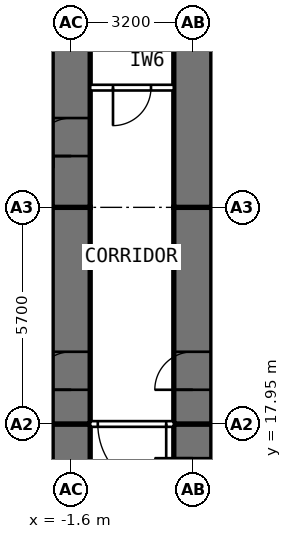
"""IFC4 building model, lengths in metres.
Left out: names, types, materials, properties, quantities, classifications, styles, units other than length and angle.
Written with IfcOpenShell. Run it as: python <this file> out.ifc"""

import sys

from ifc_helpers import new_model, si_unit, direction, frame, frame_2d, origin, place, context, subcontext, project, spatial, rectangle, extrude, element, fill, save


model = new_model("IFC4")
c1 = context("Model", 3, precision=1e-05, world=origin(), true_north=direction((0.0, 1.0)))
c2 = subcontext(c1, "Body", "Model", "MODEL_VIEW")
j1 = project(units=[si_unit("LENGTHUNIT", "METRE"), si_unit("PLANEANGLEUNIT", "RADIAN")], contexts=[c1])
p1 = place(None, origin())
s1 = spatial("IfcSite", under=j1, at=p1, CompositionType="ELEMENT")
p2 = place(p1, origin())
s2 = spatial("IfcBuilding", under=s1, at=p2, CompositionType="ELEMENT")
p3 = place(p2, frame((0.0, 0.0, 98.8)))
s3 = spatial("IfcBuildingStorey", under=s2, at=p3, CompositionType="ELEMENT", Elevation=98.8)
p4 = place(p3, frame((-1.6, 9.6, 0.0), z_axis=(0.0, 0.0, 1.0), x_axis=(0.0, 1.0, 0.0)))
e1 = element("IfcWall", 1, at=p4, inside=s3, PredefinedType="SHEAR", context=c2, shape_type="SweptSolid", body=[
    extrude(rectangle(XDim=8.35, YDim=1.0, at=frame_2d((4.175, 0.0))), origin(), (0.0, 0.0, 1.0), 3.6),
])
p5 = place(p4, frame((1.3, 0.0, 0.0)))
e2 = element("IfcOpeningElement", 2, at=p5, cuts=e1, PredefinedType="OPENING", context=c2, shape_type="SweptSolid", body=[
    extrude(rectangle(XDim=1.0, YDim=2.1, at=frame_2d((0.5, 1.05))), frame((0.0, 0.512, 0.0), z_axis=(0.0, -1.0, 0.0), x_axis=(1.0, 0.0, 0.0)), (0.0, 0.0, 1.0), 1.024),
])
p6 = place(p3, frame((-1.6, 17.95, 0.0), z_axis=(0.0, 0.0, 1.0), x_axis=(0.0, 1.0, 0.0)))
e3 = element("IfcWall", 3, at=p6, inside=s3, PredefinedType="SHEAR", context=c2, shape_type="SweptSolid", body=[
    extrude(rectangle(XDim=5.7, YDim=1.0, at=frame_2d((2.85, 0.0))), origin(), (0.0, 0.0, 1.0), 3.6),
])
p7 = place(p6, frame((0.9, 0.0, 0.0)))
e4 = element("IfcOpeningElement", 4, at=p7, cuts=e3, PredefinedType="OPENING", context=c2, shape_type="SweptSolid", body=[
    extrude(rectangle(XDim=1.0, YDim=2.1, at=frame_2d((0.5, 1.05))), frame((0.0, 0.512, 0.0), z_axis=(0.0, -1.0, 0.0), x_axis=(1.0, 0.0, 0.0)), (0.0, 0.0, 1.0), 1.024),
])
p8 = place(p3, frame((-1.6, 23.65, 0.0), z_axis=(0.0, 0.0, 1.0), x_axis=(0.0, 1.0, 0.0)))
e5 = element("IfcWall", 5, at=p8, inside=s3, PredefinedType="SHEAR", context=c2, shape_type="SweptSolid", body=[
    extrude(rectangle(XDim=10.745, YDim=1.0, at=frame_2d((5.373, 0.0))), origin(), (0.0, 0.0, 1.0), 3.6),
])
p9 = place(p8, frame((1.35, 0.0, 0.0)))
e6 = element("IfcOpeningElement", 6, at=p9, cuts=e5, PredefinedType="OPENING", context=c2, shape_type="SweptSolid", body=[
    extrude(rectangle(XDim=1.0, YDim=2.1, at=frame_2d((0.5, 1.05))), frame((0.0, 0.512, 0.0), z_axis=(0.0, -1.0, 0.0), x_axis=(1.0, 0.0, 0.0)), (0.0, 0.0, 1.0), 1.024),
])
p10 = place(p3, frame((1.6, 9.6, 0.0), z_axis=(0.0, 0.0, 1.0), x_axis=(0.0, 1.0, 0.0)))
e7 = element("IfcWall", 7, at=p10, inside=s3, PredefinedType="SHEAR", context=c2, shape_type="SweptSolid", body=[
    extrude(rectangle(XDim=8.35, YDim=1.0, at=frame_2d((4.175, 0.0))), origin(), (0.0, 0.0, 1.0), 3.6),
])
p11 = place(p10, frame((6.45, 0.0, 0.0)))
e8 = element("IfcOpeningElement", 8, at=p11, cuts=e7, PredefinedType="OPENING", context=c2, shape_type="SweptSolid", body=[
    extrude(rectangle(XDim=1.0, YDim=2.1, at=frame_2d((0.5, 1.05))), frame((0.0, 0.512, 0.0), z_axis=(0.0, -1.0, 0.0), x_axis=(1.0, 0.0, 0.0)), (0.0, 0.0, 1.0), 1.024),
])
p12 = place(p3, frame((1.6, 17.95, 0.0), z_axis=(0.0, 0.0, 1.0), x_axis=(0.0, 1.0, 0.0)))
e9 = element("IfcWall", 9, at=p12, inside=s3, PredefinedType="SHEAR", context=c2, shape_type="SweptSolid", body=[
    extrude(rectangle(XDim=5.7, YDim=1.0, at=frame_2d((2.85, 0.0))), origin(), (0.0, 0.0, 1.0), 3.6),
])
p13 = place(p12, frame((0.9, 0.0, 0.0)))
e10 = element("IfcOpeningElement", 10, at=p13, cuts=e9, PredefinedType="OPENING", context=c2, shape_type="SweptSolid", body=[
    extrude(rectangle(XDim=1.0, YDim=2.1, at=frame_2d((0.5, 1.05))), frame((0.0, 0.512, 0.0), z_axis=(0.0, -1.0, 0.0), x_axis=(1.0, 0.0, 0.0)), (0.0, 0.0, 1.0), 1.024),
])
p14 = place(p3, frame((1.6, 23.65, 0.0), z_axis=(0.0, 0.0, 1.0), x_axis=(0.0, 1.0, 0.0)))
e11 = element("IfcWall", 11, at=p14, inside=s3, PredefinedType="SHEAR", context=c2, shape_type="SweptSolid", body=[
    extrude(rectangle(XDim=10.745, YDim=1.0, at=frame_2d((5.373, 0.0))), origin(), (0.0, 0.0, 1.0), 3.6),
])
p15 = place(p3, frame((2.1, 17.95, 0.0), z_axis=(0.0, 0.0, 1.0), x_axis=(1.0, 0.0, 0.0)))
e12 = element("IfcWall", 12, at=p15, inside=s3, PredefinedType="PARTITIONING", context=c2, shape_type="SweptSolid", body=[
    extrude(rectangle(XDim=8.6, YDim=0.2, at=frame_2d((4.3, 0.0))), origin(), (0.0, 0.0, 1.0), 2.45),
])
p16 = place(p3, frame((1.1, 26.8, 0.0), z_axis=(0.0, 0.0, 1.0), x_axis=(-1.0, 0.0, 0.0)))
e13 = element("IfcWall", 13, at=p16, inside=s3, PredefinedType="PARTITIONING", context=c2, shape_type="SweptSolid", body=[
    extrude(rectangle(XDim=2.2, YDim=0.15, at=frame_2d((1.1, 0.0))), origin(), (0.0, 0.0, 1.0), 3.35),
])
p17 = place(p16, frame((0.6, 0.0, 0.0)))
e14 = element("IfcOpeningElement", 14, at=p17, cuts=e13, PredefinedType="OPENING", context=c2, shape_type="SweptSolid", body=[
    extrude(rectangle(XDim=1.0, YDim=2.1, at=frame_2d((0.5, 1.05))), frame((0.0, 0.087, 0.0), z_axis=(0.0, -1.0, 0.0), x_axis=(1.0, 0.0, 0.0)), (0.0, 0.0, 1.0), 0.174),
])
p18 = place(p3, frame((1.1, 17.95, 0.0), z_axis=(0.0, 0.0, 1.0), x_axis=(-1.0, 0.0, 0.0)))
e15 = element("IfcWall", 15, at=p18, inside=s3, PredefinedType="PARTITIONING", context=c2, shape_type="SweptSolid", body=[
    extrude(rectangle(XDim=2.2, YDim=0.15, at=frame_2d((1.1, 0.0))), origin(), (0.0, 0.0, 1.0), 3.35),
])
p19 = place(p18, frame((0.2, 0.0, 0.0)))
e16 = element("IfcOpeningElement", 16, at=p19, cuts=e15, PredefinedType="OPENING", context=c2, shape_type="SweptSolid", body=[
    extrude(rectangle(XDim=1.8, YDim=2.1, at=frame_2d((0.9, 1.05))), frame((0.0, 0.087, 0.0), z_axis=(0.0, -1.0, 0.0), x_axis=(1.0, 0.0, 0.0)), (0.0, 0.0, 1.0), 0.174),
])
p20 = place(p7, origin())
e17 = element("IfcDoor", 17, at=p20, inside=s3, OperationType="SINGLE_SWING_LEFT", PredefinedType="DOOR", context=c2, shape_type="SweptSolid", body=[
    extrude(rectangle(XDim=1.0, YDim=2.1, at=frame_2d((0.5, 1.05))), frame((0.0, 0.25, 0.0), z_axis=(0.0, -1.0, 0.0), x_axis=(1.0, 0.0, 0.0)), (0.0, 0.0, 1.0), 0.5),
])
fill(e4, e17)
p21 = place(p11, origin())
e18 = element("IfcDoor", 18, at=p21, inside=s3, OperationType="SINGLE_SWING_RIGHT", PredefinedType="DOOR", context=c2, shape_type="SweptSolid", body=[
    extrude(rectangle(XDim=1.0, YDim=2.1, at=frame_2d((0.5, 1.05))), frame((0.0, 0.25, 0.0), z_axis=(0.0, -1.0, 0.0), x_axis=(1.0, 0.0, 0.0)), (0.0, 0.0, 1.0), 0.5),
])
fill(e8, e18)
p22 = place(p13, origin())
e19 = element("IfcDoor", 19, at=p22, inside=s3, OperationType="SINGLE_SWING_LEFT", PredefinedType="DOOR", context=c2, shape_type="SweptSolid", body=[
    extrude(rectangle(XDim=1.0, YDim=2.1, at=frame_2d((0.5, 1.05))), frame((0.0, 0.25, 0.0), z_axis=(0.0, -1.0, 0.0), x_axis=(1.0, 0.0, 0.0)), (0.0, 0.0, 1.0), 0.5),
])
fill(e10, e19)
p23 = place(p17, origin())
e20 = element("IfcDoor", 20, at=p23, inside=s3, OperationType="SINGLE_SWING_RIGHT", PredefinedType="DOOR", context=c2, shape_type="SweptSolid", body=[
    extrude(rectangle(XDim=1.0, YDim=2.1, at=frame_2d((0.5, 1.05))), frame((0.0, 0.025, 0.0), z_axis=(0.0, -1.0, 0.0), x_axis=(1.0, 0.0, 0.0)), (0.0, 0.0, 1.0), 0.05),
])
fill(e14, e20)
p24 = place(p19, origin())
e21 = element("IfcDoor", 21, at=p24, inside=s3, OperationType="DOUBLE_DOOR_DOUBLE_SWING", PredefinedType="DOOR", context=c2, shape_type="SweptSolid", body=[
    extrude(rectangle(XDim=1.8, YDim=2.1, at=frame_2d((0.9, 1.05))), frame((0.0, 0.025, 0.0), z_axis=(0.0, -1.0, 0.0), x_axis=(1.0, 0.0, 0.0)), (0.0, 0.0, 1.0), 0.05),
])
fill(e16, e21)
p25 = place(p9, origin())
e22 = element("IfcDoor", 22, at=p25, inside=s3, OperationType="SINGLE_SWING_LEFT", PredefinedType="DOOR", context=c2, shape_type="SweptSolid", body=[
    extrude(rectangle(XDim=1.0, YDim=2.1, at=frame_2d((0.5, 1.05))), frame((0.0, 0.25, 0.0), z_axis=(0.0, -1.0, 0.0), x_axis=(1.0, 0.0, 0.0)), (0.0, 0.0, 1.0), 0.5),
])
fill(e6, e22)
save(model, sys.argv[1])
